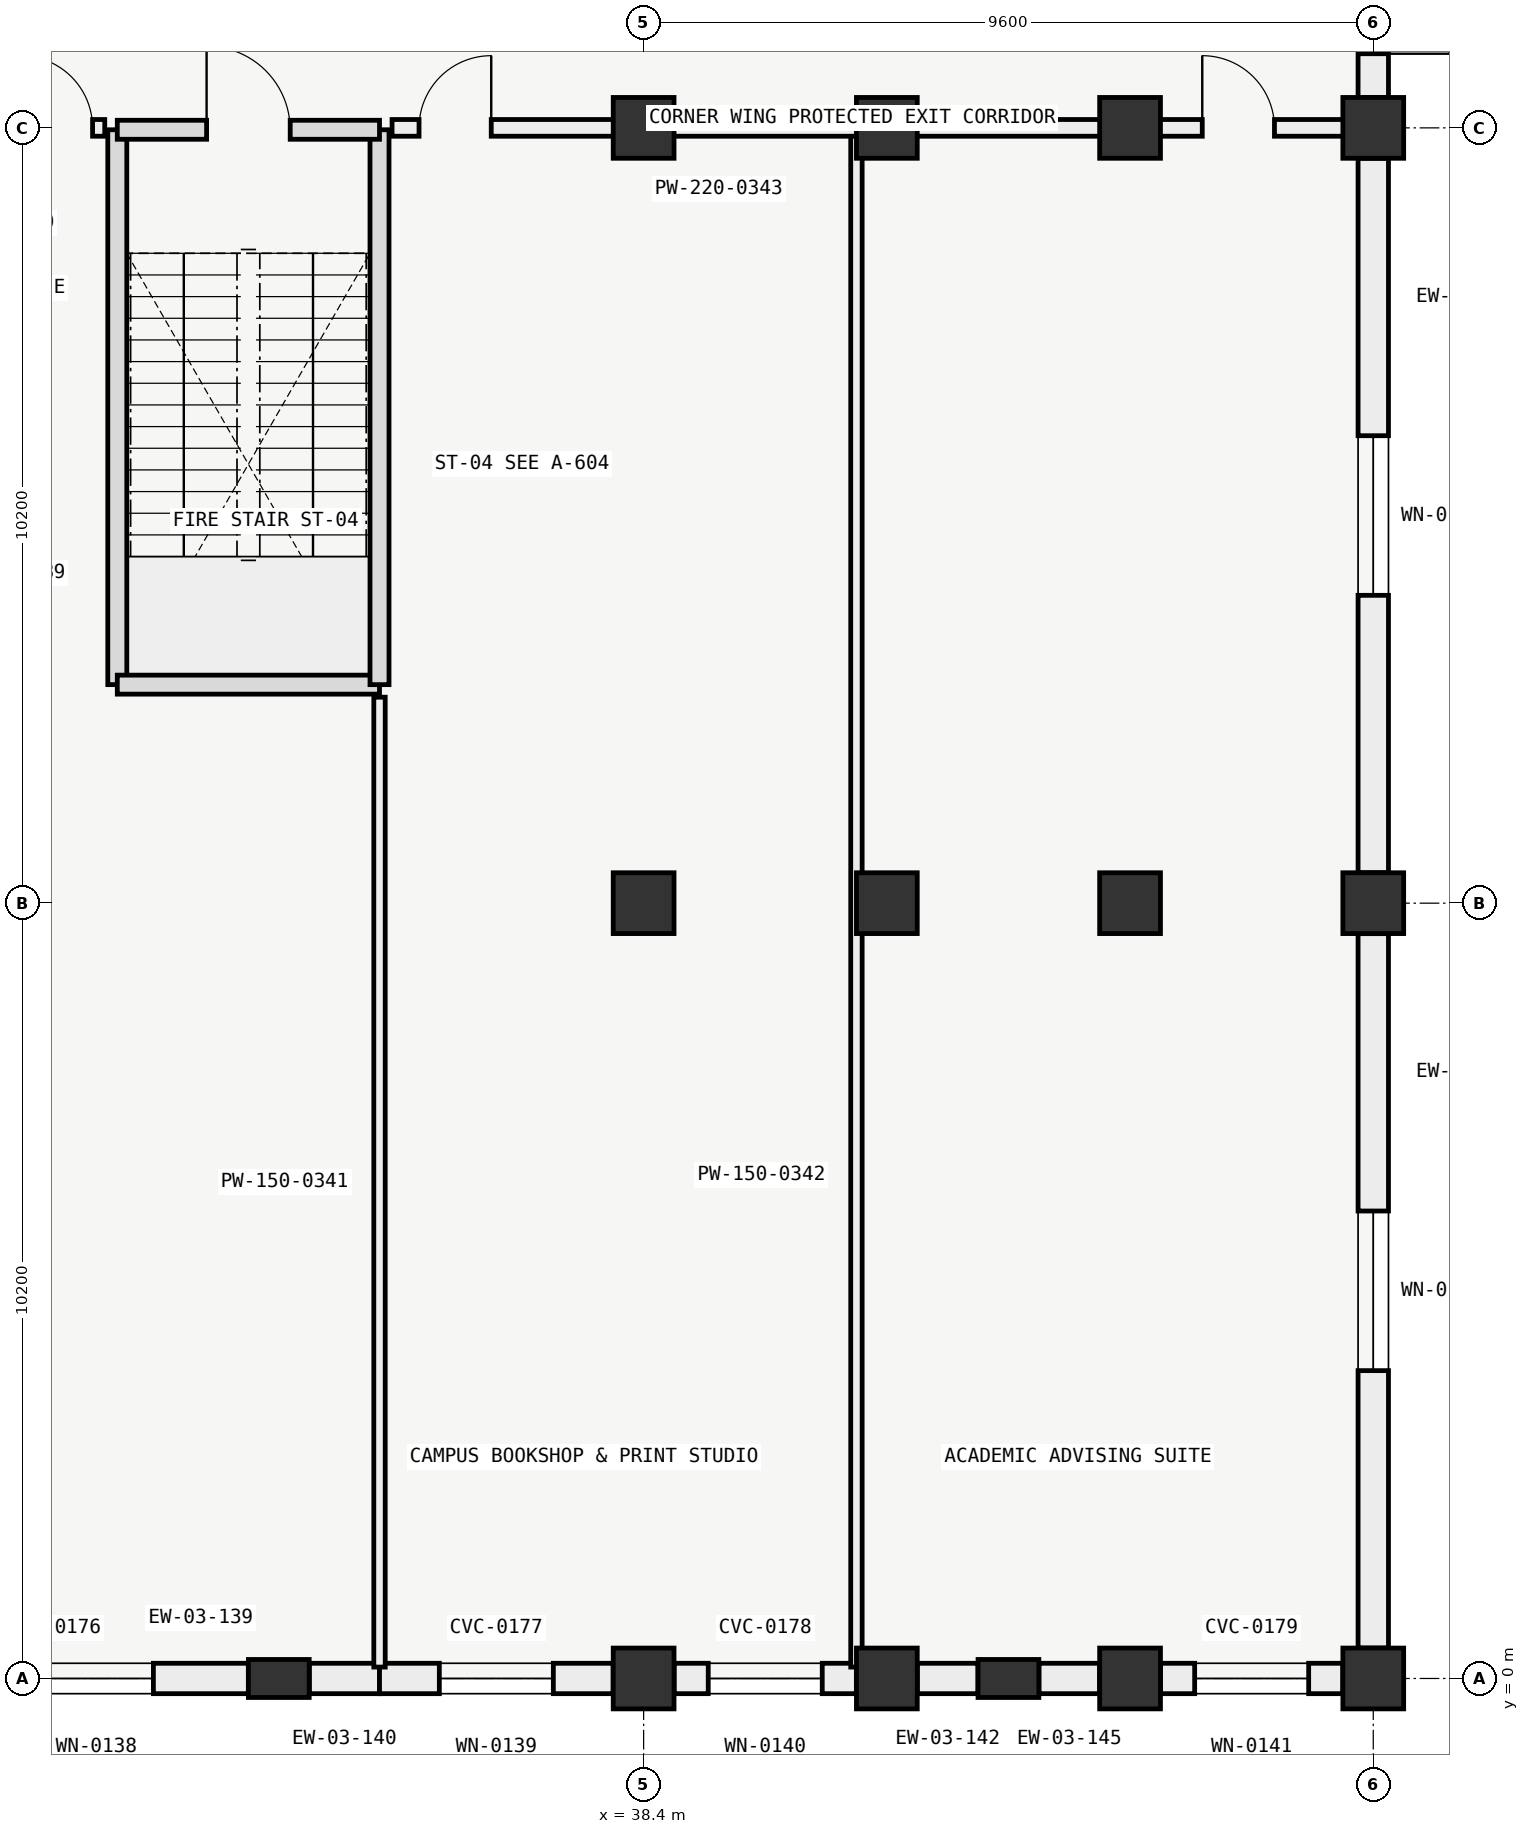
"""IFC4 building model, lengths in metres.
Left out: names, types, materials, properties, quantities, classifications, styles, units other than length and angle.
Written with IfcOpenShell. Run it as: python <this file> out.ifc"""

import sys

from ifc_helpers import new_model, si_unit, direction, frame, frame_2d, origin, origin_2d, place, context, subcontext, project, spatial, rectangle, extrude, element, fill, save


model = new_model("IFC4")
c1 = context("Model", 3, precision=1e-05, world=origin(), true_north=direction((0.0, 1.0)))
c2 = subcontext(c1, "Body", "Model", "MODEL_VIEW")
j1 = project(units=[si_unit("LENGTHUNIT", "METRE"), si_unit("PLANEANGLEUNIT", "RADIAN")], contexts=[c1])
p1 = place(None, origin())
s1 = spatial("IfcSite", under=j1, at=p1, CompositionType="ELEMENT")
p2 = place(p1, origin())
s2 = spatial("IfcBuilding", under=s1, at=p2, CompositionType="ELEMENT")
p3 = place(p2, origin())
s3 = spatial("IfcBuildingStorey", under=s2, at=p3, CompositionType="ELEMENT", Elevation=0.0)
for number, where, z_axis, x_axis in (
    (1, (38.4, 0.0, 0.0), (0.0, 0.0, 1.0), (1.0, 0.0, 0.0)),
    (2, (38.4, 10.2, 0.0), (0.0, 0.0, 1.0), (1.0, 0.0, 0.0)),
    (3, (38.4, 20.4, 0.0), (0.0, 0.0, 1.0), (1.0, 0.0, 0.0)),
    (4, (41.6, 0.0, 0.0), (0.0, 0.0, 1.0), (1.0, 0.0, 0.0)),
    (5, (41.6, 10.2, 0.0), (0.0, 0.0, 1.0), (1.0, 0.0, 0.0)),
    (6, (41.6, 20.4, 0.0), (0.0, 0.0, 1.0), (1.0, 0.0, 0.0)),
    (7, (44.8, 0.0, 0.0), (0.0, 0.0, 1.0), (1.0, 0.0, 0.0)),
    (8, (44.8, 10.2, 0.0), (0.0, 0.0, 1.0), (1.0, 0.0, 0.0)),
    (9, (44.8, 20.4, 0.0), (0.0, 0.0, 1.0), (1.0, 0.0, 0.0)),
    (10, (48.0, 0.0, 0.0), (0.0, 0.0, 1.0), (1.0, 0.0, 0.0)),
    (11, (48.0, 10.2, 0.0), (0.0, 0.0, 1.0), (1.0, 0.0, 0.0)),
    (12, (48.0, 20.4, 0.0), (0.0, 0.0, 1.0), (1.0, 0.0, 0.0)),
):
    element("IfcColumn", number, at=place(p3, frame(where, z_axis=z_axis, x_axis=x_axis)), inside=s3, PredefinedType="COLUMN", context=c2, shape_type="SweptSolid", body=[
        extrude(rectangle(XDim=0.8, YDim=0.8, at=origin_2d()), origin(), (0.0, 0.0, 1.0), 5.4),
    ])
for number, where, z_axis, x_axis in (
    (13, (33.6, 0.0, 0.0), (0.0, 0.0, 1.0), (0.0, 1.0, 0.0)),
    (14, (43.2, 0.0, 0.0), (0.0, 0.0, 1.0), (0.0, 1.0, 0.0)),
):
    element("IfcColumn", number, at=place(p3, frame(where, z_axis=z_axis, x_axis=x_axis)), inside=s3, PredefinedType="PILASTER", context=c2, shape_type="SweptSolid", body=[
        extrude(rectangle(XDim=0.5, YDim=0.8, at=origin_2d()), origin(), (0.0, 0.0, 1.0), 5.4),
    ])
p4 = place(p3, frame((33.199, 0.0, 0.0), z_axis=(0.0, 0.0, 1.0), x_axis=(-1.0, 0.0, 0.0)))
e15 = element("IfcWall", 15, at=p4, inside=s3, PredefinedType="SOLIDWALL", context=c2, shape_type="SweptSolid", body=[
    extrude(rectangle(XDim=3.998, YDim=0.4, at=frame_2d((1.999, 0.0))), origin(), (0.0, 0.0, 1.0), 3.723),
])
p5 = place(p4, frame((1.249, 0.0, 0.8)))
e16 = element("IfcOpeningElement", 16, at=p5, cuts=e15, PredefinedType="OPENING", context=c2, shape_type="SweptSolid", body=[
    extrude(rectangle(XDim=1.5, YDim=2.6, at=frame_2d((0.75, 1.3))), frame((0.0, 0.21, 0.0), z_axis=(0.0, -1.0, 0.0), x_axis=(1.0, 0.0, 0.0)), (0.0, 0.0, 1.0), 0.42),
])
p6 = place(p3, frame((34.925, 0.0, 0.0), z_axis=(0.0, 0.0, 1.0), x_axis=(-1.0, 0.0, 0.0)))
e17 = element("IfcWall", 17, at=p6, inside=s3, PredefinedType="SOLIDWALL", context=c2, shape_type="SweptSolid", body=[
    extrude(rectangle(XDim=0.924, YDim=0.4, at=frame_2d((0.462, 0.0))), origin(), (0.0, 0.0, 1.0), 3.723),
])
p7 = place(p3, frame((37.999, 0.0, 0.0), z_axis=(0.0, 0.0, 1.0), x_axis=(-1.0, 0.0, 0.0)))
e18 = element("IfcWall", 18, at=p7, inside=s3, PredefinedType="SOLIDWALL", context=c2, shape_type="SweptSolid", body=[
    extrude(rectangle(XDim=3.074, YDim=0.4, at=frame_2d((1.537, 0.0))), origin(), (0.0, 0.0, 1.0), 3.723),
])
p8 = place(p7, frame((0.787, 0.0, 0.8)))
e19 = element("IfcOpeningElement", 19, at=p8, cuts=e18, PredefinedType="OPENING", context=c2, shape_type="SweptSolid", body=[
    extrude(rectangle(XDim=1.5, YDim=2.6, at=frame_2d((0.75, 1.3))), frame((0.0, 0.21, 0.0), z_axis=(0.0, -1.0, 0.0), x_axis=(1.0, 0.0, 0.0)), (0.0, 0.0, 1.0), 0.42),
])
p9 = place(p3, frame((42.799, 0.0, 0.0), z_axis=(0.0, 0.0, 1.0), x_axis=(-1.0, 0.0, 0.0)))
e20 = element("IfcWall", 20, at=p9, inside=s3, PredefinedType="SOLIDWALL", context=c2, shape_type="SweptSolid", body=[
    extrude(rectangle(XDim=0.798, YDim=0.4, at=frame_2d((0.399, 0.0))), origin(), (0.0, 0.0, 1.0), 3.751),
])
p10 = place(p3, frame((41.199, 0.0, 0.0), z_axis=(0.0, 0.0, 1.0), x_axis=(-1.0, 0.0, 0.0)))
e21 = element("IfcWall", 21, at=p10, inside=s3, PredefinedType="SOLIDWALL", context=c2, shape_type="SweptSolid", body=[
    extrude(rectangle(XDim=2.398, YDim=0.4, at=frame_2d((1.199, 0.0))), origin(), (0.0, 0.0, 1.0), 3.751),
])
p11 = place(p10, frame((0.449, 0.0, 0.8)))
e22 = element("IfcOpeningElement", 22, at=p11, cuts=e21, PredefinedType="OPENING", context=c2, shape_type="SweptSolid", body=[
    extrude(rectangle(XDim=1.5, YDim=2.6, at=frame_2d((0.75, 1.3))), frame((0.0, 0.21, 0.0), z_axis=(0.0, -1.0, 0.0), x_axis=(1.0, 0.0, 0.0)), (0.0, 0.0, 1.0), 0.42),
])
p12 = place(p3, frame((47.599, 0.0, 0.0), z_axis=(0.0, 0.0, 1.0), x_axis=(-1.0, 0.0, 0.0)))
e23 = element("IfcWall", 23, at=p12, inside=s3, PredefinedType="SOLIDWALL", context=c2, shape_type="SweptSolid", body=[
    extrude(rectangle(XDim=2.398, YDim=0.4, at=frame_2d((1.199, 0.0))), origin(), (0.0, 0.0, 1.0), 3.751),
])
p13 = place(p12, frame((0.449, 0.0, 0.8)))
e24 = element("IfcOpeningElement", 24, at=p13, cuts=e23, PredefinedType="OPENING", context=c2, shape_type="SweptSolid", body=[
    extrude(rectangle(XDim=1.5, YDim=2.6, at=frame_2d((0.75, 1.3))), frame((0.0, 0.21, 0.0), z_axis=(0.0, -1.0, 0.0), x_axis=(1.0, 0.0, 0.0)), (0.0, 0.0, 1.0), 0.42),
])
p14 = place(p3, frame((44.399, 0.0, 0.0), z_axis=(0.0, 0.0, 1.0), x_axis=(-1.0, 0.0, 0.0)))
e25 = element("IfcWall", 25, at=p14, inside=s3, PredefinedType="SOLIDWALL", context=c2, shape_type="SweptSolid", body=[
    extrude(rectangle(XDim=0.798, YDim=0.4, at=frame_2d((0.399, 0.0))), origin(), (0.0, 0.0, 1.0), 3.751),
])
p15 = place(p3, frame((48.0, 9.799, 0.0), z_axis=(0.0, 0.0, 1.0), x_axis=(0.0, -1.0, 0.0)))
e26 = element("IfcWall", 26, at=p15, inside=s3, PredefinedType="SOLIDWALL", context=c2, shape_type="SweptSolid", body=[
    extrude(rectangle(XDim=9.398, YDim=0.4, at=frame_2d((4.699, 0.0))), origin(), (0.0, 0.0, 1.0), 4.45),
])
p16 = place(p15, frame((3.649, 0.0, 0.85)))
e27 = element("IfcOpeningElement", 27, at=p16, cuts=e26, PredefinedType="OPENING", context=c2, shape_type="SweptSolid", body=[
    extrude(rectangle(XDim=2.1, YDim=2.4, at=frame_2d((1.05, 1.2))), frame((0.0, 0.21, 0.0), z_axis=(0.0, -1.0, 0.0), x_axis=(1.0, 0.0, 0.0)), (0.0, 0.0, 1.0), 0.42),
])
p17 = place(p3, frame((48.0, 19.999, 0.0), z_axis=(0.0, 0.0, 1.0), x_axis=(0.0, -1.0, 0.0)))
e28 = element("IfcWall", 28, at=p17, inside=s3, PredefinedType="SOLIDWALL", context=c2, shape_type="SweptSolid", body=[
    extrude(rectangle(XDim=9.398, YDim=0.4, at=frame_2d((4.699, 0.0))), origin(), (0.0, 0.0, 1.0), 4.45),
])
p18 = place(p17, frame((3.649, 0.0, 0.85)))
e29 = element("IfcOpeningElement", 29, at=p18, cuts=e28, PredefinedType="OPENING", context=c2, shape_type="SweptSolid", body=[
    extrude(rectangle(XDim=2.1, YDim=2.4, at=frame_2d((1.05, 1.2))), frame((0.0, 0.21, 0.0), z_axis=(0.0, -1.0, 0.0), x_axis=(1.0, 0.0, 0.0)), (0.0, 0.0, 1.0), 0.42),
])
p19 = place(p3, frame((48.0, 23.95, 0.0), z_axis=(0.0, 0.0, 1.0), x_axis=(0.0, -1.0, 0.0)))
e30 = element("IfcWall", 30, at=p19, inside=s3, PredefinedType="SOLIDWALL", context=c2, shape_type="SweptSolid", body=[
    extrude(rectangle(XDim=3.149, YDim=0.4, at=frame_2d((1.574, 0.0))), origin(), (0.0, 0.0, 1.0), 4.45),
])
p20 = place(p19, frame((0.574, 0.0, 0.0)))
e31 = element("IfcOpeningElement", 31, at=p20, cuts=e30, PredefinedType="OPENING", context=c2, shape_type="SweptSolid", body=[
    extrude(rectangle(XDim=2.0, YDim=2.4, at=frame_2d((1.0, 1.2))), frame((0.0, 0.21, 0.0), z_axis=(0.0, -1.0, 0.0), x_axis=(1.0, 0.0, 0.0)), (0.0, 0.0, 1.0), 0.42),
])
p21 = place(p3, frame((31.475, 20.375, 0.0), z_axis=(0.0, 0.0, 1.0), x_axis=(0.0, -1.0, 0.0)))
e32 = element("IfcWall", 32, at=p21, inside=s3, PredefinedType="SOLIDWALL", context=c2, shape_type="SweptSolid", body=[
    extrude(rectangle(XDim=7.3, YDim=0.25, at=frame_2d((3.65, 0.0))), origin(), (0.0, 0.0, 1.0), 5.12),
])
p22 = place(p3, frame((31.475, 13.075, 0.0), z_axis=(0.0, 0.0, 1.0), x_axis=(1.0, 0.0, 0.0)))
e33 = element("IfcWall", 33, at=p22, inside=s3, PredefinedType="SOLIDWALL", context=c2, shape_type="SweptSolid", body=[
    extrude(rectangle(XDim=3.45, YDim=0.25, at=frame_2d((1.725, 0.0))), origin(), (0.0, 0.0, 1.0), 5.12),
])
p23 = place(p3, frame((34.925, 13.075, 0.0), z_axis=(0.0, 0.0, 1.0), x_axis=(0.0, 1.0, 0.0)))
e34 = element("IfcWall", 34, at=p23, inside=s3, PredefinedType="SOLIDWALL", context=c2, shape_type="SweptSolid", body=[
    extrude(rectangle(XDim=7.3, YDim=0.25, at=frame_2d((3.65, 0.0))), origin(), (0.0, 0.0, 1.0), 5.12),
])
p24 = place(p3, frame((31.475, 20.375, 0.0), z_axis=(0.0, 0.0, 1.0), x_axis=(1.0, 0.0, 0.0)))
e35 = element("IfcWall", 35, at=p24, inside=s3, PredefinedType="SOLIDWALL", context=c2, shape_type="SweptSolid", body=[
    extrude(rectangle(XDim=3.45, YDim=0.25, at=frame_2d((1.725, 0.0))), origin(), (0.0, 0.0, 1.0), 5.12),
])
p25 = place(p24, frame((1.175, 0.0, 0.0)))
e36 = element("IfcOpeningElement", 36, at=p25, cuts=e35, PredefinedType="OPENING", context=c2, shape_type="SweptSolid", body=[
    extrude(rectangle(XDim=1.1, YDim=2.2, at=frame_2d((0.55, 1.1))), frame((0.0, 0.135, 0.0), z_axis=(0.0, -1.0, 0.0), x_axis=(1.0, 0.0, 0.0)), (0.0, 0.0, 1.0), 0.27),
])
p26 = place(p3, frame((28.2, 20.4, 0.0), z_axis=(0.0, 0.0, 1.0), x_axis=(1.0, 0.0, 0.0)))
e37 = element("IfcWall", 37, at=p26, inside=s3, PredefinedType="PARTITIONING", context=c2, shape_type="SweptSolid", body=[
    extrude(rectangle(XDim=3.11, YDim=0.22, at=frame_2d((1.555, 0.0))), origin(), (0.0, 0.0, 1.0), 4.4),
])
p27 = place(p26, frame((2.0, 0.0, 0.0)))
e38 = element("IfcOpeningElement", 38, at=p27, cuts=e37, PredefinedType="OPENING", context=c2, shape_type="SweptSolid", body=[
    extrude(rectangle(XDim=0.95, YDim=2.1, at=frame_2d((0.475, 1.05))), frame((0.0, 0.12, 0.0), z_axis=(0.0, -1.0, 0.0), x_axis=(1.0, 0.0, 0.0)), (0.0, 0.0, 1.0), 0.24),
])
p28 = place(p3, frame((34.925, 0.15, 0.0), z_axis=(0.0, 0.0, 1.0), x_axis=(0.0, 1.0, 0.0)))
e39 = element("IfcWall", 39, at=p28, inside=s3, PredefinedType="PARTITIONING", context=c2, shape_type="SweptSolid", body=[
    extrude(rectangle(XDim=12.76, YDim=0.15, at=frame_2d((6.38, 0.0))), origin(), (0.0, 0.0, 1.0), 4.4),
])
p29 = place(p3, frame((41.2, 0.15, 0.0), z_axis=(0.0, 0.0, 1.0), x_axis=(0.0, 1.0, 0.0)))
e40 = element("IfcWall", 40, at=p29, inside=s3, PredefinedType="PARTITIONING", context=c2, shape_type="SweptSolid", body=[
    extrude(rectangle(XDim=20.25, YDim=0.15, at=frame_2d((10.125, 0.0))), origin(), (0.0, 0.0, 1.0), 4.4),
])
p30 = place(p3, frame((35.09, 20.4, 0.0), z_axis=(0.0, 0.0, 1.0), x_axis=(1.0, 0.0, 0.0)))
e41 = element("IfcWall", 41, at=p30, inside=s3, PredefinedType="PARTITIONING", context=c2, shape_type="SweptSolid", body=[
    extrude(rectangle(XDim=12.76, YDim=0.22, at=frame_2d((6.38, 0.0))), origin(), (0.0, 0.0, 1.0), 4.4),
])
p31 = place(p30, frame((0.355, 0.0, 0.0)))
e42 = element("IfcOpeningElement", 42, at=p31, cuts=e41, PredefinedType="OPENING", context=c2, shape_type="SweptSolid", body=[
    extrude(rectangle(XDim=0.95, YDim=2.1, at=frame_2d((0.475, 1.05))), frame((0.0, 0.12, 0.0), z_axis=(0.0, -1.0, 0.0), x_axis=(1.0, 0.0, 0.0)), (0.0, 0.0, 1.0), 0.24),
])
p32 = place(p30, frame((10.66, 0.0, 0.0)))
e43 = element("IfcOpeningElement", 43, at=p32, cuts=e41, PredefinedType="OPENING", context=c2, shape_type="SweptSolid", body=[
    extrude(rectangle(XDim=0.95, YDim=2.1, at=frame_2d((0.475, 1.05))), frame((0.0, 0.12, 0.0), z_axis=(0.0, -1.0, 0.0), x_axis=(1.0, 0.0, 0.0)), (0.0, 0.0, 1.0), 0.24),
])
p33 = place(p5, origin())
e44 = element("IfcWindow", 44, at=p33, inside=s3, PartitioningType="SINGLE_PANEL", PredefinedType="WINDOW", context=c2, shape_type="SweptSolid", body=[
    extrude(rectangle(XDim=1.5, YDim=2.6, at=frame_2d((0.75, 1.3))), frame((0.0, 0.03, 0.0), z_axis=(0.0, -1.0, 0.0), x_axis=(1.0, 0.0, 0.0)), (0.0, 0.0, 1.0), 0.06),
])
fill(e16, e44)
p34 = place(p8, origin())
e45 = element("IfcWindow", 45, at=p34, inside=s3, PartitioningType="SINGLE_PANEL", PredefinedType="WINDOW", context=c2, shape_type="SweptSolid", body=[
    extrude(rectangle(XDim=1.5, YDim=2.6, at=frame_2d((0.75, 1.3))), frame((0.0, 0.03, 0.0), z_axis=(0.0, -1.0, 0.0), x_axis=(1.0, 0.0, 0.0)), (0.0, 0.0, 1.0), 0.06),
])
fill(e19, e45)
p35 = place(p11, origin())
e46 = element("IfcWindow", 46, at=p35, inside=s3, PartitioningType="SINGLE_PANEL", PredefinedType="WINDOW", context=c2, shape_type="SweptSolid", body=[
    extrude(rectangle(XDim=1.5, YDim=2.6, at=frame_2d((0.75, 1.3))), frame((0.0, 0.03, 0.0), z_axis=(0.0, -1.0, 0.0), x_axis=(1.0, 0.0, 0.0)), (0.0, 0.0, 1.0), 0.06),
])
fill(e22, e46)
p36 = place(p13, origin())
e47 = element("IfcWindow", 47, at=p36, inside=s3, PartitioningType="SINGLE_PANEL", PredefinedType="WINDOW", context=c2, shape_type="SweptSolid", body=[
    extrude(rectangle(XDim=1.5, YDim=2.6, at=frame_2d((0.75, 1.3))), frame((0.0, 0.03, 0.0), z_axis=(0.0, -1.0, 0.0), x_axis=(1.0, 0.0, 0.0)), (0.0, 0.0, 1.0), 0.06),
])
fill(e24, e47)
p37 = place(p16, origin())
e48 = element("IfcWindow", 48, at=p37, inside=s3, PartitioningType="SINGLE_PANEL", PredefinedType="WINDOW", context=c2, shape_type="SweptSolid", body=[
    extrude(rectangle(XDim=2.1, YDim=2.4, at=frame_2d((1.05, 1.2))), frame((0.0, 0.03, 0.0), z_axis=(0.0, -1.0, 0.0), x_axis=(1.0, 0.0, 0.0)), (0.0, 0.0, 1.0), 0.06),
])
fill(e27, e48)
p38 = place(p18, origin())
e49 = element("IfcWindow", 49, at=p38, inside=s3, PartitioningType="SINGLE_PANEL", PredefinedType="WINDOW", context=c2, shape_type="SweptSolid", body=[
    extrude(rectangle(XDim=2.1, YDim=2.4, at=frame_2d((1.05, 1.2))), frame((0.0, 0.03, 0.0), z_axis=(0.0, -1.0, 0.0), x_axis=(1.0, 0.0, 0.0)), (0.0, 0.0, 1.0), 0.06),
])
fill(e29, e49)
p39 = place(p20, origin())
e50 = element("IfcDoor", 50, at=p39, inside=s3, OperationType="DOUBLE_DOOR_SINGLE_SWING", PredefinedType="DOOR", context=c2, shape_type="SweptSolid", body=[
    extrude(rectangle(XDim=2.0, YDim=2.4, at=frame_2d((1.0, 1.2))), frame((0.0, 0.025, 0.0), z_axis=(0.0, -1.0, 0.0), x_axis=(1.0, 0.0, 0.0)), (0.0, 0.0, 1.0), 0.05),
])
fill(e31, e50)
p40 = place(p25, origin())
e51 = element("IfcDoor", 51, at=p40, inside=s3, OperationType="SINGLE_SWING_LEFT", PredefinedType="DOOR", context=c2, shape_type="SweptSolid", body=[
    extrude(rectangle(XDim=1.1, YDim=2.2, at=frame_2d((0.55, 1.1))), frame((0.0, 0.025, 0.0), z_axis=(0.0, -1.0, 0.0), x_axis=(1.0, 0.0, 0.0)), (0.0, 0.0, 1.0), 0.05),
])
fill(e36, e51)
p41 = place(p27, origin())
e52 = element("IfcDoor", 52, at=p41, inside=s3, OperationType="SINGLE_SWING_LEFT", PredefinedType="DOOR", context=c2, shape_type="SweptSolid", body=[
    extrude(rectangle(XDim=0.95, YDim=2.1, at=frame_2d((0.475, 1.05))), frame((0.0, 0.025, 0.0), z_axis=(0.0, -1.0, 0.0), x_axis=(1.0, 0.0, 0.0)), (0.0, 0.0, 1.0), 0.05),
])
fill(e38, e52)
p42 = place(p31, origin())
e53 = element("IfcDoor", 53, at=p42, inside=s3, OperationType="SINGLE_SWING_RIGHT", PredefinedType="DOOR", context=c2, shape_type="SweptSolid", body=[
    extrude(rectangle(XDim=0.95, YDim=2.1, at=frame_2d((0.475, 1.05))), frame((0.0, 0.025, 0.0), z_axis=(0.0, -1.0, 0.0), x_axis=(1.0, 0.0, 0.0)), (0.0, 0.0, 1.0), 0.05),
])
fill(e42, e53)
p43 = place(p32, origin())
e54 = element("IfcDoor", 54, at=p43, inside=s3, OperationType="SINGLE_SWING_LEFT", PredefinedType="DOOR", context=c2, shape_type="SweptSolid", body=[
    extrude(rectangle(XDim=0.95, YDim=2.1, at=frame_2d((0.475, 1.05))), frame((0.0, 0.025, 0.0), z_axis=(0.0, -1.0, 0.0), x_axis=(1.0, 0.0, 0.0)), (0.0, 0.0, 1.0), 0.05),
])
fill(e43, e54)
save(model, sys.argv[1])
